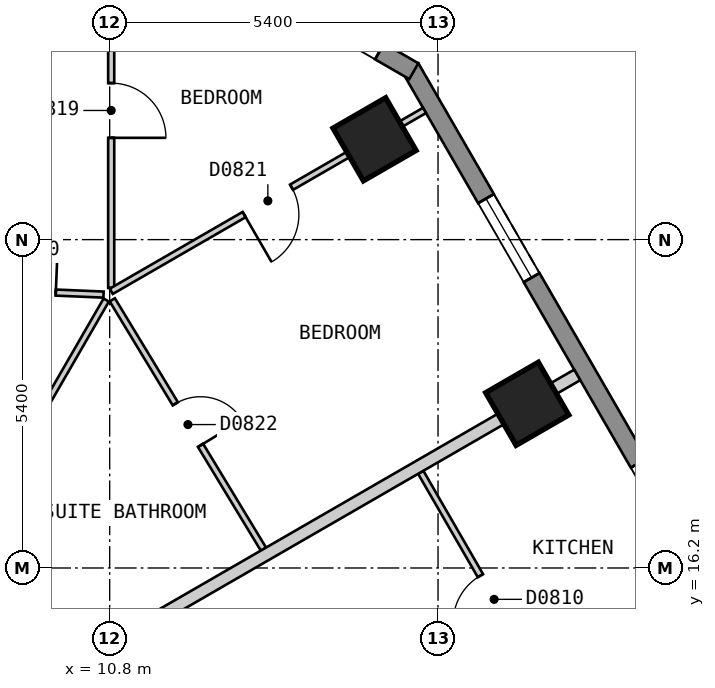
"""IFC4 building model, lengths in metres.
Left out: names, types, materials, properties, quantities, classifications, styles, units other than length and angle.
Written with IfcOpenShell. Run it as: python <this file> out.ifc"""

import sys

from ifc_helpers import new_model, si_unit, direction, frame, frame_2d, origin, origin_2d, place, context, subcontext, project, spatial, polyline, rectangle, outline, extrude, element, fill, save


model = new_model("IFC4")
c1 = context("Model", 3, precision=1e-05, world=origin(), true_north=direction((0.0, 1.0)))
c2 = subcontext(c1, "Body", "Model", "MODEL_VIEW")
j1 = project(units=[si_unit("LENGTHUNIT", "METRE"), si_unit("PLANEANGLEUNIT", "RADIAN")], contexts=[c1])
p1 = place(None, origin())
s1 = spatial("IfcSite", under=j1, at=p1, CompositionType="ELEMENT")
p2 = place(p1, origin())
s2 = spatial("IfcBuilding", under=s1, at=p2, CompositionType="ELEMENT")
p3 = place(p2, frame((0.0, 0.0, 84.0)))
s3 = spatial("IfcBuildingStorey", under=s2, at=p3, CompositionType="ELEMENT", Elevation=84.0)
for number, where, z_axis, x_axis in (
    (1, (17.667, 18.9, 0.0), (0.0, 0.0, 1.0), (-0.5, 0.866, 0.0)),
    (2, (15.156, 23.25, 0.0), (0.0, 0.0, 1.0), (-0.5, 0.866, 0.0)),
):
    element("IfcColumn", number, at=place(p3, frame(where, z_axis=z_axis, x_axis=x_axis)), inside=s3, PredefinedType="COLUMN", context=c2, shape_type="SweptSolid", body=[
        extrude(rectangle(XDim=1.0, YDim=1.0, at=origin_2d()), origin(), (0.0, 0.0, 1.0), 3.0),
    ])
p4 = place(p3, frame((29.027, 1.425, 0.0), z_axis=(0.0, 0.0, 1.0), x_axis=(-0.500027479704, 0.866009537788, 0.0)))
e3 = element("IfcWall", 3, at=p4, inside=s3, PredefinedType="SOLIDWALL", context=c2, shape_type="SweptSolid", body=[
    extrude(outline(polyline([(0.0, -0.15), (26.559, -0.15), (26.478, 0.15), (0.08, 0.15), (0.0, -0.15)])), origin(), (0.0, 0.0, 1.0), 2.7),
])
p5 = place(p4, frame((2.483, 0.0, 0.15)))
e4 = element("IfcOpeningElement", 4, at=p5, cuts=e3, PredefinedType="OPENING", context=c2, shape_type="SweptSolid", body=[
    extrude(rectangle(XDim=1.5, YDim=2.1, at=frame_2d((0.75, 1.05))), frame((0.0, 0.16, 0.0), z_axis=(0.0, -1.0, 0.0), x_axis=(1.0, 0.0, 0.0)), (0.0, 0.0, 1.0), 0.32),
])
p6 = place(p4, frame((7.506, 0.0, 0.15)))
e5 = element("IfcOpeningElement", 5, at=p6, cuts=e3, PredefinedType="OPENING", context=c2, shape_type="SweptSolid", body=[
    extrude(rectangle(XDim=1.5, YDim=2.1, at=frame_2d((0.75, 1.05))), frame((0.0, 0.16, 0.0), z_axis=(0.0, -1.0, 0.0), x_axis=(1.0, 0.0, 0.0)), (0.0, 0.0, 1.0), 0.32),
])
p7 = place(p4, frame((12.529, 0.0, 0.15)))
e6 = element("IfcOpeningElement", 6, at=p7, cuts=e3, PredefinedType="OPENING", context=c2, shape_type="SweptSolid", body=[
    extrude(rectangle(XDim=1.5, YDim=2.1, at=frame_2d((0.75, 1.05))), frame((0.0, 0.16, 0.0), z_axis=(0.0, -1.0, 0.0), x_axis=(1.0, 0.0, 0.0)), (0.0, 0.0, 1.0), 0.32),
])
p8 = place(p4, frame((17.552, 0.0, 0.15)))
e7 = element("IfcOpeningElement", 7, at=p8, cuts=e3, PredefinedType="OPENING", context=c2, shape_type="SweptSolid", body=[
    extrude(rectangle(XDim=1.5, YDim=2.1, at=frame_2d((0.75, 1.05))), frame((0.0, 0.16, 0.0), z_axis=(0.0, -1.0, 0.0), x_axis=(1.0, 0.0, 0.0)), (0.0, 0.0, 1.0), 0.32),
])
p9 = place(p4, frame((22.575, 0.0, 0.15)))
e8 = element("IfcOpeningElement", 8, at=p9, cuts=e3, PredefinedType="OPENING", context=c2, shape_type="SweptSolid", body=[
    extrude(rectangle(XDim=1.5, YDim=2.1, at=frame_2d((0.75, 1.05))), frame((0.0, 0.16, 0.0), z_axis=(0.0, -1.0, 0.0), x_axis=(1.0, 0.0, 0.0)), (0.0, 0.0, 1.0), 0.32),
])
p10 = place(p3, frame((15.802, 24.37, 0.0), z_axis=(0.0, 0.0, 1.0), x_axis=(-0.866022959057, 0.500004234368, 0.0)))
e9 = element("IfcWall", 9, at=p10, inside=s3, PredefinedType="SOLIDWALL", context=c2, shape_type="SweptSolid", body=[
    extrude(outline(polyline([(0.0, -0.15), (5.0, -0.15), (4.92, 0.15), (0.08, 0.15), (0.0, -0.15)])), origin(), (0.0, 0.0, 1.0), 2.7),
])
p11 = place(p10, frame((0.65, 0.0, 0.15)))
e10 = element("IfcOpeningElement", 10, at=p11, cuts=e9, PredefinedType="OPENING", context=c2, shape_type="SweptSolid", body=[
    extrude(rectangle(XDim=1.2, YDim=2.1, at=frame_2d((0.6, 1.05))), frame((0.0, 0.16, 0.0), z_axis=(0.0, -1.0, 0.0), x_axis=(1.0, 0.0, 0.0)), (0.0, 0.0, 1.0), 0.32),
])
p12 = place(p3, frame((8.488, 16.5, 0.0), z_axis=(0.0, 0.0, 1.0), x_axis=(0.499986836607, -0.86603300354, 0.0)))
e11 = element("IfcWall", 11, at=p12, inside=s3, PredefinedType="PARTITIONING", context=c2, shape_type="SweptSolid", body=[
    extrude(rectangle(XDim=20.09, YDim=0.2, at=frame_2d((10.045, 0.0))), origin(), (0.0, 0.0, 1.0), 2.7),
])
p13 = place(p12, frame((4.523, 0.0, 0.0)))
e12 = element("IfcOpeningElement", 12, at=p13, cuts=e11, PredefinedType="OPENING", context=c2, shape_type="SweptSolid", body=[
    extrude(rectangle(XDim=1.0, YDim=2.1, at=frame_2d((0.5, 1.05))), frame((0.0, 0.11, 0.0), z_axis=(0.0, -1.0, 0.0), x_axis=(1.0, 0.0, 0.0)), (0.0, 0.0, 1.0), 0.22),
])
p14 = place(p3, frame((10.843, 20.61, 0.0), z_axis=(0.0, 0.0, 1.0), x_axis=(0.518481125811, -0.855089072657, 0.0)))
e13 = element("IfcWall", 13, at=p14, inside=s3, PredefinedType="PARTITIONING", context=c2, shape_type="SweptSolid", body=[
    extrude(rectangle(XDim=4.795, YDim=0.1, at=frame_2d((2.397, 0.0))), origin(), (0.0, 0.0, 1.0), 2.7),
])
p15 = place(p14, frame((1.999, 0.0, 0.0)))
e14 = element("IfcOpeningElement", 14, at=p15, cuts=e13, PredefinedType="OPENING", context=c2, shape_type="SweptSolid", body=[
    extrude(rectangle(XDim=0.8, YDim=2.1, at=frame_2d((0.4, 1.05))), frame((0.0, 0.06, 0.0), z_axis=(0.0, -1.0, 0.0), x_axis=(1.0, 0.0, 0.0)), (0.0, 0.0, 1.0), 0.12),
])
p16 = place(p3, frame((15.916, 17.773, 0.0), z_axis=(0.0, 0.0, 1.0), x_axis=(0.500093956194, -0.865971151354, 0.0)))
e15 = element("IfcWall", 15, at=p16, inside=s3, PredefinedType="PARTITIONING", context=c2, shape_type="SweptSolid", body=[
    extrude(rectangle(XDim=4.873, YDim=0.1, at=frame_2d((2.437, 0.0))), origin(), (0.0, 0.0, 1.0), 2.7),
])
p17 = place(p16, frame((1.962, 0.0, 0.0)))
e16 = element("IfcOpeningElement", 16, at=p17, cuts=e15, PredefinedType="OPENING", context=c2, shape_type="SweptSolid", body=[
    extrude(rectangle(XDim=0.9, YDim=2.1, at=frame_2d((0.45, 1.05))), frame((0.0, 0.06, 0.0), z_axis=(0.0, -1.0, 0.0), x_axis=(1.0, 0.0, 0.0)), (0.0, 0.0, 1.0), 0.12),
])
p18 = place(p3, frame((8.235, 20.8, 0.0), z_axis=(0.0, 0.0, 1.0), x_axis=(0.999110277005, -0.042174096116, 0.0)))
e17 = element("IfcWall", 17, at=p18, inside=s3, PredefinedType="PARTITIONING", context=c2, shape_type="SweptSolid", body=[
    extrude(rectangle(XDim=2.466, YDim=0.1, at=frame_2d((1.233, 0.0))), origin(), (0.0, 0.0, 1.0), 2.7),
])
p19 = place(p18, frame((0.88, 0.0, 0.0)))
e18 = element("IfcOpeningElement", 18, at=p19, cuts=e17, PredefinedType="OPENING", context=c2, shape_type="SweptSolid", body=[
    extrude(rectangle(XDim=0.8, YDim=2.1, at=frame_2d((0.4, 1.05))), frame((0.0, 0.06, 0.0), z_axis=(0.0, -1.0, 0.0), x_axis=(1.0, 0.0, 0.0)), (0.0, 0.0, 1.0), 0.12),
])
p20 = place(p3, frame((8.43, 16.6, 0.0), z_axis=(0.0, 0.0, 1.0), x_axis=(0.50003312339, 0.866006279142, 0.0)))
e19 = element("IfcWall", 19, at=p20, inside=s3, PredefinedType="PARTITIONING", context=c2, shape_type="SweptSolid", body=[
    extrude(rectangle(XDim=4.626, YDim=0.1, at=frame_2d((2.313, 0.0))), origin(), (0.0, 0.0, 1.0), 2.7),
])
p21 = place(p3, frame((10.825, 20.806, 0.0), z_axis=(0.0, 0.0, 1.0), x_axis=(0.0, 1.0, 0.0)))
e20 = element("IfcWall", 20, at=p21, inside=s3, PredefinedType="PARTITIONING", context=c2, shape_type="SweptSolid", body=[
    extrude(rectangle(XDim=5.894, YDim=0.1, at=frame_2d((2.947, 0.0))), origin(), (0.0, 0.0, 1.0), 2.7),
])
p22 = place(p21, frame((2.468, 0.0, 0.0)))
e21 = element("IfcOpeningElement", 21, at=p22, cuts=e20, PredefinedType="OPENING", context=c2, shape_type="SweptSolid", body=[
    extrude(rectangle(XDim=0.9, YDim=2.1, at=frame_2d((0.45, 1.05))), frame((0.0, 0.06, 0.0), z_axis=(0.0, -1.0, 0.0), x_axis=(1.0, 0.0, 0.0)), (0.0, 0.0, 1.0), 0.12),
])
p23 = place(p3, frame((10.826, 20.75, 0.0), z_axis=(0.0, 0.0, 1.0), x_axis=(0.865986712877, 0.50006700863, 0.0)))
e22 = element("IfcWall", 22, at=p23, inside=s3, PredefinedType="PARTITIONING", context=c2, shape_type="SweptSolid", body=[
    extrude(rectangle(XDim=5.949, YDim=0.1, at=frame_2d((2.975, 0.0))), origin(), (0.0, 0.0, 1.0), 2.7),
])
p24 = place(p23, frame((2.524, 0.0, 0.0)))
e23 = element("IfcOpeningElement", 23, at=p24, cuts=e22, PredefinedType="OPENING", context=c2, shape_type="SweptSolid", body=[
    extrude(rectangle(XDim=0.9, YDim=2.1, at=frame_2d((0.45, 1.05))), frame((0.0, 0.06, 0.0), z_axis=(0.0, -1.0, 0.0), x_axis=(1.0, 0.0, 0.0)), (0.0, 0.0, 1.0), 0.12),
])
p25 = place(p3, frame((9.83, 14.375, 0.0), z_axis=(0.0, 0.0, 1.0), x_axis=(0.865992435864, 0.500057097767, 0.0)))
e24 = element("IfcWall", 24, at=p25, inside=s3, PredefinedType="PARTITIONING", context=c2, shape_type="SweptSolid", body=[
    extrude(rectangle(XDim=9.999, YDim=0.2, at=frame_2d((5.0, 0.0))), origin(), (0.0, 0.0, 1.0), 2.7),
])
p26 = place(p9, origin())
e25 = element("IfcWindow", 25, at=p26, inside=s3, PartitioningType="SINGLE_PANEL", PredefinedType="WINDOW", context=c2, shape_type="SweptSolid", body=[
    extrude(rectangle(XDim=1.5, YDim=2.1, at=frame_2d((0.75, 1.05))), frame((0.0, 0.03, 0.0), z_axis=(0.0, -1.0, 0.0), x_axis=(1.0, 0.0, 0.0)), (0.0, 0.0, 1.0), 0.06),
])
fill(e8, e25)
p27 = place(p11, origin())
e26 = element("IfcWindow", 26, at=p27, inside=s3, PartitioningType="SINGLE_PANEL", PredefinedType="WINDOW", context=c2, shape_type="SweptSolid", body=[
    extrude(rectangle(XDim=1.2, YDim=2.1, at=frame_2d((0.6, 1.05))), frame((0.0, 0.03, 0.0), z_axis=(0.0, -1.0, 0.0), x_axis=(1.0, 0.0, 0.0)), (0.0, 0.0, 1.0), 0.06),
])
fill(e10, e26)
p28 = place(p17, origin())
e27 = element("IfcDoor", 27, at=p28, inside=s3, OperationType="SINGLE_SWING_RIGHT", PredefinedType="DOOR", context=c2, shape_type="SweptSolid", body=[
    extrude(rectangle(XDim=0.9, YDim=2.1, at=frame_2d((0.45, 1.05))), frame((0.0, 0.025, 0.0), z_axis=(0.0, -1.0, 0.0), x_axis=(1.0, 0.0, 0.0)), (0.0, 0.0, 1.0), 0.05),
])
fill(e16, e27)
p29 = place(p22, origin())
e28 = element("IfcDoor", 28, at=p29, inside=s3, OperationType="SINGLE_SWING_LEFT", PredefinedType="DOOR", context=c2, shape_type="SweptSolid", body=[
    extrude(rectangle(XDim=0.9, YDim=2.1, at=frame_2d((0.45, 1.05))), frame((0.0, 0.025, 0.0), z_axis=(0.0, -1.0, 0.0), x_axis=(1.0, 0.0, 0.0)), (0.0, 0.0, 1.0), 0.05),
])
fill(e21, e28)
p30 = place(p19, origin())
e29 = element("IfcDoor", 29, at=p30, inside=s3, OperationType="SINGLE_SWING_RIGHT", PredefinedType="DOOR", context=c2, shape_type="SweptSolid", body=[
    extrude(rectangle(XDim=0.8, YDim=2.1, at=frame_2d((0.4, 1.05))), frame((0.0, 0.025, 0.0), z_axis=(0.0, -1.0, 0.0), x_axis=(1.0, 0.0, 0.0)), (0.0, 0.0, 1.0), 0.05),
])
fill(e18, e29)
p31 = place(p24, origin())
e30 = element("IfcDoor", 30, at=p31, inside=s3, OperationType="SINGLE_SWING_LEFT", PredefinedType="DOOR", context=c2, shape_type="SweptSolid", body=[
    extrude(rectangle(XDim=0.9, YDim=2.1, at=frame_2d((0.45, 1.05))), frame((0.0, 0.025, 0.0), z_axis=(0.0, -1.0, 0.0), x_axis=(1.0, 0.0, 0.0)), (0.0, 0.0, 1.0), 0.05),
])
fill(e23, e30)
p32 = place(p15, origin())
e31 = element("IfcDoor", 31, at=p32, inside=s3, OperationType="SINGLE_SWING_RIGHT", PredefinedType="DOOR", context=c2, shape_type="SweptSolid", body=[
    extrude(rectangle(XDim=0.8, YDim=2.1, at=frame_2d((0.4, 1.05))), frame((0.0, 0.025, 0.0), z_axis=(0.0, -1.0, 0.0), x_axis=(1.0, 0.0, 0.0)), (0.0, 0.0, 1.0), 0.05),
])
fill(e14, e31)
save(model, sys.argv[1])
